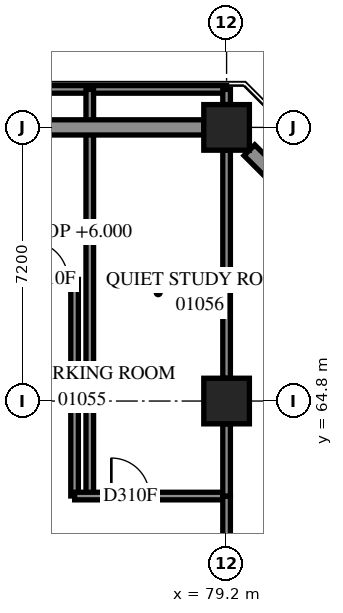
"""IFC4 building model, lengths in metres.
Left out: names, types, materials, properties, quantities, classifications, styles, units other than length and angle.
Written with IfcOpenShell. Run it as: python <this file> out.ifc"""

import sys

from ifc_helpers import new_model, si_unit, direction, frame, frame_2d, origin, origin_2d, place, context, subcontext, project, spatial, rectangle, extrude, element, fill, save


model = new_model("IFC4")
c1 = context("Model", 3, precision=1e-05, world=origin(), true_north=direction((0.0, 1.0)))
c2 = subcontext(c1, "Body", "Model", "MODEL_VIEW")
j1 = project(units=[si_unit("LENGTHUNIT", "METRE"), si_unit("PLANEANGLEUNIT", "RADIAN")], contexts=[c1])
p1 = place(None, origin())
s1 = spatial("IfcSite", under=j1, at=p1, CompositionType="ELEMENT")
p2 = place(p1, origin())
s2 = spatial("IfcBuilding", under=s1, at=p2, CompositionType="ELEMENT")
p3 = place(p2, frame((0.0, 0.0, 6.0)))
s3 = spatial("IfcBuildingStorey", under=s2, at=p3, CompositionType="ELEMENT", Elevation=6.0)
for number, where, z_axis, x_axis in (
    (1, (79.2, 64.8, 0.0), (0.0, 0.0, 1.0), (1.0, 0.0, 0.0)),
    (2, (79.2, 72.0, 0.0), (0.0, 0.0, 1.0), (1.0, 0.0, 0.0)),
):
    element("IfcColumn", number, at=place(p3, frame(where, z_axis=z_axis, x_axis=x_axis)), inside=s3, PredefinedType="COLUMN", context=c2, shape_type="SweptSolid", body=[
        extrude(rectangle(XDim=1.2, YDim=1.2, at=origin_2d()), origin(), (0.0, 0.0, 1.0), 3.8),
    ])
p4 = place(p3, frame((6.0, 73.0, 0.0), z_axis=(0.0, 0.0, 1.0), x_axis=(1.0, 0.0, 0.0)))
e3 = element("IfcWall", 3, at=p4, inside=s3, PredefinedType="PARTITIONING", context=c2, shape_type="SweptSolid", body=[
    extrude(rectangle(XDim=73.2, YDim=0.2, at=frame_2d((36.6, 0.0))), origin(), (0.0, 0.0, 1.0), 3.8),
])
p5 = place(p3, frame((54.4, 68.0, 0.0), z_axis=(0.0, 0.0, 1.0), x_axis=(1.0, 0.0, 0.0)))
e4 = element("IfcWall", 4, at=p5, inside=s3, PredefinedType="PARTITIONING", context=c2, shape_type="SweptSolid", body=[
    extrude(rectangle(XDim=20.8, YDim=0.2, at=frame_2d((10.4, 0.0))), origin(), (0.0, 0.0, 1.0), 3.8),
])
p6 = place(p5, frame((0.121, 0.0, 0.0)))
e5 = element("IfcOpeningElement", 5, at=p6, cuts=e4, PredefinedType="OPENING", context=c2, shape_type="SweptSolid", body=[
    extrude(rectangle(XDim=1.0, YDim=2.1, at=frame_2d((0.5, 1.05))), frame((0.0, 0.11, 0.0), z_axis=(0.0, -1.0, 0.0), x_axis=(1.0, 0.0, 0.0)), (0.0, 0.0, 1.0), 0.22),
])
p7 = place(p5, frame((19.622, 0.0, 0.0)))
e6 = element("IfcOpeningElement", 6, at=p7, cuts=e4, PredefinedType="OPENING", context=c2, shape_type="SweptSolid", body=[
    extrude(rectangle(XDim=1.0, YDim=2.1, at=frame_2d((0.5, 1.05))), frame((0.0, 0.11, 0.0), z_axis=(0.0, -1.0, 0.0), x_axis=(1.0, 0.0, 0.0)), (0.0, 0.0, 1.0), 0.22),
])
p8 = place(p5, frame((8.858, 0.0, 0.0)))
e7 = element("IfcOpeningElement", 7, at=p8, cuts=e4, PredefinedType="OPENING", context=c2, shape_type="SweptSolid", body=[
    extrude(rectangle(XDim=1.0, YDim=2.1, at=frame_2d((0.5, 1.05))), frame((0.0, 0.11, 0.0), z_axis=(0.0, -1.0, 0.0), x_axis=(1.0, 0.0, 0.0)), (0.0, 0.0, 1.0), 0.22),
])
p9 = place(p5, frame((14.568, 0.0, 0.0)))
e8 = element("IfcOpeningElement", 8, at=p9, cuts=e4, PredefinedType="OPENING", context=c2, shape_type="SweptSolid", body=[
    extrude(rectangle(XDim=1.0, YDim=2.1, at=frame_2d((0.5, 1.05))), frame((0.0, 0.11, 0.0), z_axis=(0.0, -1.0, 0.0), x_axis=(1.0, 0.0, 0.0)), (0.0, 0.0, 1.0), 0.22),
])
p10 = place(p3, frame((75.6, 62.3, 0.0), z_axis=(0.0, 0.0, 1.0), x_axis=(0.0, 1.0, 0.0)))
e9 = element("IfcWall", 9, at=p10, inside=s3, PredefinedType="PARTITIONING", context=c2, shape_type="SweptSolid", body=[
    extrude(rectangle(XDim=10.7, YDim=0.2, at=frame_2d((5.35, 0.0))), origin(), (0.0, 0.0, 1.0), 3.8),
])
p11 = place(p3, frame((79.2, 65.4, 0.0), z_axis=(0.0, 0.0, 1.0), x_axis=(0.0, 1.0, 0.0)))
e10 = element("IfcWall", 10, at=p11, inside=s3, PredefinedType="PARTITIONING", context=c2, shape_type="SweptSolid", body=[
    extrude(rectangle(XDim=6.0, YDim=0.2, at=frame_2d((3.0, 0.0))), origin(), (0.0, 0.0, 1.0), 3.8),
])
p12 = place(p3, frame((75.2, 62.302, 0.0), z_axis=(0.0, 0.0, 1.0), x_axis=(0.0, 1.0, 0.0)))
e11 = element("IfcWall", 11, at=p12, inside=s3, PredefinedType="PARTITIONING", context=c2, shape_type="SweptSolid", body=[
    extrude(rectangle(XDim=5.698, YDim=0.2, at=frame_2d((2.849, 0.0))), origin(), (0.0, 0.0, 1.0), 3.8),
])
p13 = place(p3, frame((75.202, 62.3, 0.0), z_axis=(0.0, 0.0, 1.0), x_axis=(1.0, 0.0, 0.0)))
e12 = element("IfcWall", 12, at=p13, inside=s3, PredefinedType="PARTITIONING", context=c2, shape_type="SweptSolid", body=[
    extrude(rectangle(XDim=3.998, YDim=0.2, at=frame_2d((1.999, 0.0))), origin(), (0.0, 0.0, 1.0), 3.8),
])
p14 = place(p13, frame((0.966, 0.0, 0.0)))
e13 = element("IfcOpeningElement", 13, at=p14, cuts=e12, PredefinedType="OPENING", context=c2, shape_type="SweptSolid", body=[
    extrude(rectangle(XDim=1.0, YDim=2.1, at=frame_2d((0.5, 1.05))), frame((0.0, 0.11, 0.0), z_axis=(0.0, -1.0, 0.0), x_axis=(1.0, 0.0, 0.0)), (0.0, 0.0, 1.0), 0.22),
])
p15 = place(p3, frame((79.2, 60.1, 0.0), z_axis=(0.0, 0.0, 1.0), x_axis=(0.0, 1.0, 0.0)))
e14 = element("IfcWall", 14, at=p15, inside=s3, PredefinedType="PARTITIONING", context=c2, shape_type="SweptSolid", body=[
    extrude(rectangle(XDim=2.2, YDim=0.2, at=frame_2d((1.1, 0.0))), origin(), (0.0, 0.0, 1.0), 3.8),
])
p16 = place(p3, frame((79.2, 62.3, 0.0), z_axis=(0.0, 0.0, 1.0), x_axis=(0.0, 1.0, 0.0)))
e15 = element("IfcWall", 15, at=p16, inside=s3, PredefinedType="PARTITIONING", context=c2, shape_type="SweptSolid", body=[
    extrude(rectangle(XDim=1.9, YDim=0.2, at=frame_2d((0.95, 0.0))), origin(), (0.0, 0.0, 1.0), 3.8),
])
p17 = place(p3, frame((79.2, 72.6, 0.0), z_axis=(0.0, 0.0, 1.0), x_axis=(0.0, 1.0, 0.0)))
e16 = element("IfcWall", 16, at=p17, inside=s3, PredefinedType="PARTITIONING", context=c2, shape_type="SweptSolid", body=[
    extrude(rectangle(XDim=0.4, YDim=0.2, at=frame_2d((0.2, 0.0))), origin(), (0.0, 0.0, 1.0), 3.8),
])
p18 = place(p7, origin())
e17 = element("IfcDoor", 17, at=p18, inside=s3, OperationType="SINGLE_SWING_RIGHT", PredefinedType="DOOR", context=c2, shape_type="SweptSolid", body=[
    extrude(rectangle(XDim=1.0, YDim=2.1, at=frame_2d((0.5, 1.05))), frame((0.0, 0.025, 0.0), z_axis=(0.0, -1.0, 0.0), x_axis=(1.0, 0.0, 0.0)), (0.0, 0.0, 1.0), 0.05),
])
fill(e6, e17)
p19 = place(p14, origin())
e18 = element("IfcDoor", 18, at=p19, inside=s3, OperationType="SINGLE_SWING_LEFT", PredefinedType="DOOR", context=c2, shape_type="SweptSolid", body=[
    extrude(rectangle(XDim=1.0, YDim=2.1, at=frame_2d((0.5, 1.05))), frame((0.0, 0.025, 0.0), z_axis=(0.0, -1.0, 0.0), x_axis=(1.0, 0.0, 0.0)), (0.0, 0.0, 1.0), 0.05),
])
fill(e13, e18)
save(model, sys.argv[1])
